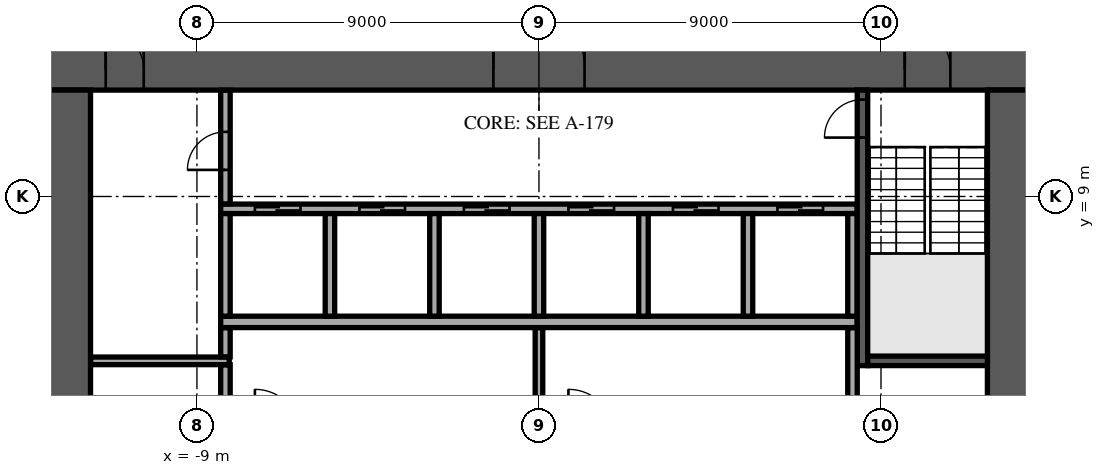
"""IFC4 building model, lengths in metres.
Left out: names, types, materials, properties, quantities, classifications, styles, units other than length and angle.
Written with IfcOpenShell. Run it as: python <this file> out.ifc"""

import sys

from ifc_helpers import new_model, si_unit, direction, frame, frame_2d, origin, place, context, subcontext, project, spatial, rectangle, extrude, element, fill, save


model = new_model("IFC4")
c1 = context("Model", 3, precision=1e-05, world=origin(), true_north=direction((0.0, 1.0)))
c2 = subcontext(c1, "Body", "Model", "MODEL_VIEW")
j1 = project(units=[si_unit("LENGTHUNIT", "METRE"), si_unit("PLANEANGLEUNIT", "RADIAN")], contexts=[c1])
p1 = place(None, origin())
s1 = spatial("IfcSite", under=j1, at=p1, CompositionType="ELEMENT")
p2 = place(p1, origin())
s2 = spatial("IfcBuilding", under=s1, at=p2, CompositionType="ELEMENT")
p3 = place(p2, frame((0.0, 0.0, 114.1)))
s3 = spatial("IfcBuildingStorey", under=s2, at=p3, CompositionType="ELEMENT", Elevation=114.1)
p4 = place(p3, frame((-12.9, 12.35, 0.0), z_axis=(0.0, 0.0, 1.0), x_axis=(1.0, 0.0, 0.0)))
e1 = element("IfcWall", 1, at=p4, inside=s3, PredefinedType="SHEAR", context=c2, shape_type="SweptSolid", body=[
    extrude(rectangle(XDim=25.8, YDim=1.1, at=frame_2d((12.9, 0.0))), origin(), (0.0, 0.0, 1.0), 3.58),
])
p5 = place(p4, frame((11.7, 0.0, 0.0)))
e2 = element("IfcOpeningElement", 2, at=p5, cuts=e1, PredefinedType="OPENING", context=c2, shape_type="SweptSolid", body=[
    extrude(rectangle(XDim=2.4, YDim=2.4, at=frame_2d((1.2, 1.2))), frame((0.0, 0.56, 0.0), z_axis=(0.0, -1.0, 0.0), x_axis=(1.0, 0.0, 0.0)), (0.0, 0.0, 1.0), 1.12),
])
p6 = place(p4, frame((22.525, 0.0, 0.0)))
e3 = element("IfcOpeningElement", 3, at=p6, cuts=e1, PredefinedType="OPENING", context=c2, shape_type="SweptSolid", body=[
    extrude(rectangle(XDim=1.2, YDim=2.1, at=frame_2d((0.6, 1.05))), frame((0.0, 0.56, 0.0), z_axis=(0.0, -1.0, 0.0), x_axis=(1.0, 0.0, 0.0)), (0.0, 0.0, 1.0), 1.12),
])
p7 = place(p4, frame((1.5, 0.0, 0.0)))
e4 = element("IfcOpeningElement", 4, at=p7, cuts=e1, PredefinedType="OPENING", context=c2, shape_type="SweptSolid", body=[
    extrude(rectangle(XDim=1.0, YDim=2.1, at=frame_2d((0.5, 1.05))), frame((0.0, 0.56, 0.0), z_axis=(0.0, -1.0, 0.0), x_axis=(1.0, 0.0, 0.0)), (0.0, 0.0, 1.0), 1.12),
])
p8 = place(p3, frame((12.35, -11.8, 0.0), z_axis=(0.0, 0.0, 1.0), x_axis=(0.0, 1.0, 0.0)))
e5 = element("IfcWall", 5, at=p8, inside=s3, PredefinedType="SHEAR", context=c2, shape_type="SweptSolid", body=[
    extrude(rectangle(XDim=23.6, YDim=1.1, at=frame_2d((11.8, 0.0))), origin(), (0.0, 0.0, 1.0), 3.58),
])
p9 = place(p8, frame((10.6, 0.0, 0.0)))
e6 = element("IfcOpeningElement", 6, at=p9, cuts=e5, PredefinedType="OPENING", context=c2, shape_type="SweptSolid", body=[
    extrude(rectangle(XDim=2.4, YDim=2.4, at=frame_2d((1.2, 1.2))), frame((0.0, 0.56, 0.0), z_axis=(0.0, -1.0, 0.0), x_axis=(1.0, 0.0, 0.0)), (0.0, 0.0, 1.0), 1.12),
])
p10 = place(p3, frame((-12.35, -11.8, 0.0), z_axis=(0.0, 0.0, 1.0), x_axis=(0.0, 1.0, 0.0)))
e7 = element("IfcWall", 7, at=p10, inside=s3, PredefinedType="SHEAR", context=c2, shape_type="SweptSolid", body=[
    extrude(rectangle(XDim=23.6, YDim=1.1, at=frame_2d((11.8, 0.0))), origin(), (0.0, 0.0, 1.0), 3.58),
])
p11 = place(p10, frame((10.6, 0.0, 0.0)))
e8 = element("IfcOpeningElement", 8, at=p11, cuts=e7, PredefinedType="OPENING", context=c2, shape_type="SweptSolid", body=[
    extrude(rectangle(XDim=2.4, YDim=2.4, at=frame_2d((1.2, 1.2))), frame((0.0, 0.56, 0.0), z_axis=(0.0, -1.0, 0.0), x_axis=(1.0, 0.0, 0.0)), (0.0, 0.0, 1.0), 1.12),
])
p12 = place(p3, frame((-8.375, 5.7, 0.0), z_axis=(0.0, 0.0, 1.0), x_axis=(1.0, 0.0, 0.0)))
e9 = element("IfcWall", 9, at=p12, inside=s3, PredefinedType="SOLIDWALL", context=c2, shape_type="SweptSolid", body=[
    extrude(rectangle(XDim=16.75, YDim=0.3, at=frame_2d((8.375, 0.0))), origin(), (0.0, 0.0, 1.0), 3.58),
])
p13 = place(p3, frame((-8.375, 8.675, 0.0), z_axis=(0.0, 0.0, 1.0), x_axis=(1.0, 0.0, 0.0)))
e10 = element("IfcWall", 10, at=p13, inside=s3, PredefinedType="SOLIDWALL", context=c2, shape_type="SweptSolid", body=[
    extrude(rectangle(XDim=16.75, YDim=0.25, at=frame_2d((8.375, 0.0))), origin(), (0.0, 0.0, 1.0), 3.58),
])
p14 = place(p13, frame((0.9, 0.0, 0.0)))
e11 = element("IfcOpeningElement", 11, at=p14, cuts=e10, PredefinedType="OPENING", context=c2, shape_type="SweptSolid", body=[
    extrude(rectangle(XDim=1.2, YDim=2.1, at=frame_2d((0.6, 1.05))), frame((0.0, 0.135, 0.0), z_axis=(0.0, -1.0, 0.0), x_axis=(1.0, 0.0, 0.0)), (0.0, 0.0, 1.0), 0.27),
])
p15 = place(p13, frame((3.65, 0.0, 0.0)))
e12 = element("IfcOpeningElement", 12, at=p15, cuts=e10, PredefinedType="OPENING", context=c2, shape_type="SweptSolid", body=[
    extrude(rectangle(XDim=1.2, YDim=2.1, at=frame_2d((0.6, 1.05))), frame((0.0, 0.135, 0.0), z_axis=(0.0, -1.0, 0.0), x_axis=(1.0, 0.0, 0.0)), (0.0, 0.0, 1.0), 0.27),
])
p16 = place(p13, frame((6.4, 0.0, 0.0)))
e13 = element("IfcOpeningElement", 13, at=p16, cuts=e10, PredefinedType="OPENING", context=c2, shape_type="SweptSolid", body=[
    extrude(rectangle(XDim=1.2, YDim=2.1, at=frame_2d((0.6, 1.05))), frame((0.0, 0.135, 0.0), z_axis=(0.0, -1.0, 0.0), x_axis=(1.0, 0.0, 0.0)), (0.0, 0.0, 1.0), 0.27),
])
p17 = place(p13, frame((9.15, 0.0, 0.0)))
e14 = element("IfcOpeningElement", 14, at=p17, cuts=e10, PredefinedType="OPENING", context=c2, shape_type="SweptSolid", body=[
    extrude(rectangle(XDim=1.2, YDim=2.1, at=frame_2d((0.6, 1.05))), frame((0.0, 0.135, 0.0), z_axis=(0.0, -1.0, 0.0), x_axis=(1.0, 0.0, 0.0)), (0.0, 0.0, 1.0), 0.27),
])
p18 = place(p13, frame((11.9, 0.0, 0.0)))
e15 = element("IfcOpeningElement", 15, at=p18, cuts=e10, PredefinedType="OPENING", context=c2, shape_type="SweptSolid", body=[
    extrude(rectangle(XDim=1.2, YDim=2.1, at=frame_2d((0.6, 1.05))), frame((0.0, 0.135, 0.0), z_axis=(0.0, -1.0, 0.0), x_axis=(1.0, 0.0, 0.0)), (0.0, 0.0, 1.0), 0.27),
])
p19 = place(p13, frame((14.65, 0.0, 0.0)))
e16 = element("IfcOpeningElement", 16, at=p19, cuts=e10, PredefinedType="OPENING", context=c2, shape_type="SweptSolid", body=[
    extrude(rectangle(XDim=1.2, YDim=2.1, at=frame_2d((0.6, 1.05))), frame((0.0, 0.135, 0.0), z_axis=(0.0, -1.0, 0.0), x_axis=(1.0, 0.0, 0.0)), (0.0, 0.0, 1.0), 0.27),
])
for number, where, z_axis, x_axis in (
    (17, (-8.25, 5.85, 0.0), (0.0, 0.0, 1.0), (0.0, 1.0, 0.0)),
    (18, (-5.5, 5.85, 0.0), (0.0, 0.0, 1.0), (0.0, 1.0, 0.0)),
    (19, (-2.75, 5.85, 0.0), (0.0, 0.0, 1.0), (0.0, 1.0, 0.0)),
    (20, (0.0, 5.85, 0.0), (0.0, 0.0, 1.0), (0.0, 1.0, 0.0)),
    (21, (2.75, 5.85, 0.0), (0.0, 0.0, 1.0), (0.0, 1.0, 0.0)),
    (22, (5.5, 5.85, 0.0), (0.0, 0.0, 1.0), (0.0, 1.0, 0.0)),
    (23, (8.25, 5.85, 0.0), (0.0, 0.0, 1.0), (0.0, 1.0, 0.0)),
):
    element("IfcWall", number, at=place(p3, frame(where, z_axis=z_axis, x_axis=x_axis)), inside=s3, PredefinedType="SOLIDWALL", context=c2, shape_type="SweptSolid", body=[
        extrude(rectangle(XDim=2.7, YDim=0.25, at=frame_2d((1.35, 0.0))), origin(), (0.0, 0.0, 1.0), 3.58),
    ])
p20 = place(p3, frame((8.512, 4.55, 0.0), z_axis=(0.0, 0.0, 1.0), x_axis=(0.0, 1.0, 0.0)))
e24 = element("IfcWall", 24, at=p20, inside=s3, PredefinedType="SOLIDWALL", context=c2, shape_type="SweptSolid", body=[
    extrude(rectangle(XDim=7.25, YDim=0.275, at=frame_2d((3.625, 0.0))), origin(), (0.0, 0.0, 1.0), 3.58),
])
p21 = place(p20, frame((6.0, 0.0, 0.0)))
e25 = element("IfcOpeningElement", 25, at=p21, cuts=e24, PredefinedType="OPENING", context=c2, shape_type="SweptSolid", body=[
    extrude(rectangle(XDim=1.0, YDim=2.1, at=frame_2d((0.5, 1.05))), frame((0.0, 0.147, 0.0), z_axis=(0.0, -1.0, 0.0), x_axis=(1.0, 0.0, 0.0)), (0.0, 0.0, 1.0), 0.295),
])
p22 = place(p3, frame((8.65, 4.675, 0.0), z_axis=(0.0, 0.0, 1.0), x_axis=(1.0, 0.0, 0.0)))
e26 = element("IfcWall", 26, at=p22, inside=s3, PredefinedType="SOLIDWALL", context=c2, shape_type="SweptSolid", body=[
    extrude(rectangle(XDim=3.15, YDim=0.25, at=frame_2d((1.575, 0.0))), origin(), (0.0, 0.0, 1.0), 3.58),
])
p23 = place(p3, frame((-8.25, 2.855, 0.0), z_axis=(0.0, 0.0, 1.0), x_axis=(0.0, 1.0, 0.0)))
e27 = element("IfcWall", 27, at=p23, inside=s3, PredefinedType="PARTITIONING", context=c2, shape_type="SweptSolid", body=[
    extrude(rectangle(XDim=1.715, YDim=0.25, at=frame_2d((0.857, 0.0))), origin(), (0.0, 0.0, 1.0), 3.58),
])
p24 = place(p3, frame((0.0, 2.855, 0.0), z_axis=(0.0, 0.0, 1.0), x_axis=(0.0, 1.0, 0.0)))
e28 = element("IfcWall", 28, at=p24, inside=s3, PredefinedType="PARTITIONING", context=c2, shape_type="SweptSolid", body=[
    extrude(rectangle(XDim=2.69, YDim=0.2, at=frame_2d((1.345, 0.0))), origin(), (0.0, 0.0, 1.0), 3.58),
])
p25 = place(p3, frame((8.25, 2.855, 0.0), z_axis=(0.0, 0.0, 1.0), x_axis=(0.0, 1.0, 0.0)))
e29 = element("IfcWall", 29, at=p25, inside=s3, PredefinedType="PARTITIONING", context=c2, shape_type="SweptSolid", body=[
    extrude(rectangle(XDim=2.69, YDim=0.25, at=frame_2d((1.345, 0.0))), origin(), (0.0, 0.0, 1.0), 3.58),
])
p26 = place(p3, frame((-11.795, 4.675, 0.0), z_axis=(0.0, 0.0, 1.0), x_axis=(1.0, 0.0, 0.0)))
e30 = element("IfcWall", 30, at=p26, inside=s3, PredefinedType="PARTITIONING", context=c2, shape_type="SweptSolid", body=[
    extrude(rectangle(XDim=3.645, YDim=0.2, at=frame_2d((1.823, 0.0))), origin(), (0.0, 0.0, 1.0), 3.58),
])
p27 = place(p3, frame((-8.25, 4.78, 0.0), z_axis=(0.0, 0.0, 1.0), x_axis=(0.0, 1.0, 0.0)))
e31 = element("IfcWall", 31, at=p27, inside=s3, PredefinedType="PARTITIONING", context=c2, shape_type="SweptSolid", body=[
    extrude(rectangle(XDim=0.765, YDim=0.25, at=frame_2d((0.382, 0.0))), origin(), (0.0, 0.0, 1.0), 3.58),
])
p28 = place(p3, frame((-8.25, 8.805, 0.0), z_axis=(0.0, 0.0, 1.0), x_axis=(0.0, 1.0, 0.0)))
e32 = element("IfcWall", 32, at=p28, inside=s3, PredefinedType="PARTITIONING", context=c2, shape_type="SweptSolid", body=[
    extrude(rectangle(XDim=2.99, YDim=0.25, at=frame_2d((1.495, 0.0))), origin(), (0.0, 0.0, 1.0), 3.58),
])
p29 = place(p28, frame((0.895, 0.0, 0.0)))
e33 = element("IfcOpeningElement", 33, at=p29, cuts=e32, PredefinedType="OPENING", context=c2, shape_type="SweptSolid", body=[
    extrude(rectangle(XDim=1.0, YDim=2.1, at=frame_2d((0.5, 1.05))), frame((0.0, 0.135, 0.0), z_axis=(0.0, -1.0, 0.0), x_axis=(1.0, 0.0, 0.0)), (0.0, 0.0, 1.0), 0.27),
])
p30 = place(p5, origin())
e34 = element("IfcDoor", 34, at=p30, inside=s3, OperationType="SINGLE_SWING_LEFT", PredefinedType="DOOR", context=c2, shape_type="SweptSolid", body=[
    extrude(rectangle(XDim=2.4, YDim=2.4, at=frame_2d((1.2, 1.2))), frame((0.0, 0.025, 0.0), z_axis=(0.0, -1.0, 0.0), x_axis=(1.0, 0.0, 0.0)), (0.0, 0.0, 1.0), 0.05),
])
fill(e2, e34)
p31 = place(p6, origin())
e35 = element("IfcDoor", 35, at=p31, inside=s3, OperationType="SINGLE_SWING_LEFT", PredefinedType="DOOR", context=c2, shape_type="SweptSolid", body=[
    extrude(rectangle(XDim=1.2, YDim=2.1, at=frame_2d((0.6, 1.05))), frame((0.0, 0.025, 0.0), z_axis=(0.0, -1.0, 0.0), x_axis=(1.0, 0.0, 0.0)), (0.0, 0.0, 1.0), 0.05),
])
fill(e3, e35)
p32 = place(p7, origin())
e36 = element("IfcDoor", 36, at=p32, inside=s3, OperationType="SINGLE_SWING_LEFT", PredefinedType="DOOR", context=c2, shape_type="SweptSolid", body=[
    extrude(rectangle(XDim=1.0, YDim=2.1, at=frame_2d((0.5, 1.05))), frame((0.0, 0.025, 0.0), z_axis=(0.0, -1.0, 0.0), x_axis=(1.0, 0.0, 0.0)), (0.0, 0.0, 1.0), 0.05),
])
fill(e4, e36)
p33 = place(p14, origin())
e37 = element("IfcDoor", 37, at=p33, inside=s3, OperationType="DOUBLE_DOOR_SLIDING", PredefinedType="DOOR", context=c2, shape_type="SweptSolid", body=[
    extrude(rectangle(XDim=1.2, YDim=2.1, at=frame_2d((0.6, 1.05))), frame((0.0, 0.025, 0.0), z_axis=(0.0, -1.0, 0.0), x_axis=(1.0, 0.0, 0.0)), (0.0, 0.0, 1.0), 0.05),
])
fill(e11, e37)
p34 = place(p15, origin())
e38 = element("IfcDoor", 38, at=p34, inside=s3, OperationType="DOUBLE_DOOR_SLIDING", PredefinedType="DOOR", context=c2, shape_type="SweptSolid", body=[
    extrude(rectangle(XDim=1.2, YDim=2.1, at=frame_2d((0.6, 1.05))), frame((0.0, 0.025, 0.0), z_axis=(0.0, -1.0, 0.0), x_axis=(1.0, 0.0, 0.0)), (0.0, 0.0, 1.0), 0.05),
])
fill(e12, e38)
p35 = place(p16, origin())
e39 = element("IfcDoor", 39, at=p35, inside=s3, OperationType="DOUBLE_DOOR_SLIDING", PredefinedType="DOOR", context=c2, shape_type="SweptSolid", body=[
    extrude(rectangle(XDim=1.2, YDim=2.1, at=frame_2d((0.6, 1.05))), frame((0.0, 0.025, 0.0), z_axis=(0.0, -1.0, 0.0), x_axis=(1.0, 0.0, 0.0)), (0.0, 0.0, 1.0), 0.05),
])
fill(e13, e39)
p36 = place(p17, origin())
e40 = element("IfcDoor", 40, at=p36, inside=s3, OperationType="DOUBLE_DOOR_SLIDING", PredefinedType="DOOR", context=c2, shape_type="SweptSolid", body=[
    extrude(rectangle(XDim=1.2, YDim=2.1, at=frame_2d((0.6, 1.05))), frame((0.0, 0.025, 0.0), z_axis=(0.0, -1.0, 0.0), x_axis=(1.0, 0.0, 0.0)), (0.0, 0.0, 1.0), 0.05),
])
fill(e14, e40)
p37 = place(p18, origin())
e41 = element("IfcDoor", 41, at=p37, inside=s3, OperationType="DOUBLE_DOOR_SLIDING", PredefinedType="DOOR", context=c2, shape_type="SweptSolid", body=[
    extrude(rectangle(XDim=1.2, YDim=2.1, at=frame_2d((0.6, 1.05))), frame((0.0, 0.025, 0.0), z_axis=(0.0, -1.0, 0.0), x_axis=(1.0, 0.0, 0.0)), (0.0, 0.0, 1.0), 0.05),
])
fill(e15, e41)
p38 = place(p19, origin())
e42 = element("IfcDoor", 42, at=p38, inside=s3, OperationType="DOUBLE_DOOR_SLIDING", PredefinedType="DOOR", context=c2, shape_type="SweptSolid", body=[
    extrude(rectangle(XDim=1.2, YDim=2.1, at=frame_2d((0.6, 1.05))), frame((0.0, 0.025, 0.0), z_axis=(0.0, -1.0, 0.0), x_axis=(1.0, 0.0, 0.0)), (0.0, 0.0, 1.0), 0.05),
])
fill(e16, e42)
p39 = place(p21, origin())
e43 = element("IfcDoor", 43, at=p39, inside=s3, OperationType="SINGLE_SWING_LEFT", PredefinedType="DOOR", context=c2, shape_type="SweptSolid", body=[
    extrude(rectangle(XDim=1.0, YDim=2.1, at=frame_2d((0.5, 1.05))), frame((0.0, 0.025, 0.0), z_axis=(0.0, -1.0, 0.0), x_axis=(1.0, 0.0, 0.0)), (0.0, 0.0, 1.0), 0.05),
])
fill(e25, e43)
p40 = place(p29, origin())
e44 = element("IfcDoor", 44, at=p40, inside=s3, OperationType="SINGLE_SWING_LEFT", PredefinedType="DOOR", context=c2, shape_type="SweptSolid", body=[
    extrude(rectangle(XDim=1.0, YDim=2.1, at=frame_2d((0.5, 1.05))), frame((0.0, 0.025, 0.0), z_axis=(0.0, -1.0, 0.0), x_axis=(1.0, 0.0, 0.0)), (0.0, 0.0, 1.0), 0.05),
])
fill(e33, e44)
save(model, sys.argv[1])
